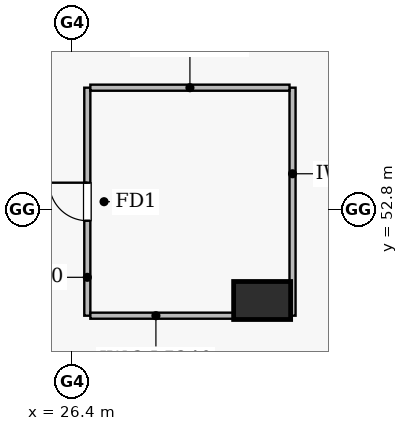
"""IFC4 building model, lengths in metres.
Left out: names, types, materials, properties, quantities, classifications, styles, units other than length and angle.
Written with IfcOpenShell. Run it as: python <this file> out.ifc"""

import sys

from ifc_helpers import new_model, si_unit, direction, frame, frame_2d, origin, origin_2d, place, context, subcontext, project, spatial, rectangle, extrude, element, fill, save


model = new_model("IFC4")
c1 = context("Model", 3, precision=1e-05, world=origin(), true_north=direction((0.0, 1.0)))
c2 = subcontext(c1, "Body", "Model", "MODEL_VIEW")
j1 = project(units=[si_unit("LENGTHUNIT", "METRE"), si_unit("PLANEANGLEUNIT", "RADIAN")], contexts=[c1])
p1 = place(None, origin())
s1 = spatial("IfcSite", under=j1, at=p1, CompositionType="ELEMENT")
p2 = place(p1, origin())
s2 = spatial("IfcBuilding", under=s1, at=p2, CompositionType="ELEMENT")
p3 = place(p2, frame((0.0, 0.0, -7.8)))
s3 = spatial("IfcBuildingStorey", under=s2, at=p3, CompositionType="ELEMENT", Elevation=-7.8)
p4 = place(p3, frame((31.4, 50.4, 0.0), z_axis=(0.0, 0.0, 1.0), x_axis=(1.0, 0.0, 0.0)))
e1 = element("IfcColumn", 1, at=p4, inside=s3, PredefinedType="COLUMN", context=c2, shape_type="SweptSolid", body=[
    extrude(rectangle(XDim=1.5, YDim=1.0, at=origin_2d()), origin(), (0.0, 0.0, 1.0), 3.9),
])
p5 = place(p3, frame((26.8, 50.0, 0.0), z_axis=(0.0, 0.0, 1.0), x_axis=(0.0, 1.0, 0.0)))
e2 = element("IfcWall", 2, at=p5, inside=s3, PredefinedType="SOLIDWALL", context=c2, shape_type="SweptSolid", body=[
    extrude(rectangle(XDim=6.0, YDim=0.16, at=frame_2d((3.0, 0.0))), origin(), (0.0, 0.0, 1.0), 2.768),
])
p6 = place(p5, frame((2.5, 0.0, 0.0)))
e3 = element("IfcOpeningElement", 3, at=p6, cuts=e2, PredefinedType="OPENING", context=c2, shape_type="SweptSolid", body=[
    extrude(rectangle(XDim=1.0, YDim=2.15, at=frame_2d((0.5, 1.075))), frame((0.0, 0.09, 0.0), z_axis=(0.0, -1.0, 0.0), x_axis=(1.0, 0.0, 0.0)), (0.0, 0.0, 1.0), 0.18),
])
p7 = place(p3, frame((32.2, 56.0, 0.0), z_axis=(0.0, 0.0, 1.0), x_axis=(0.0, -1.0, 0.0)))
e4 = element("IfcWall", 4, at=p7, inside=s3, PredefinedType="SOLIDWALL", context=c2, shape_type="SweptSolid", body=[
    extrude(rectangle(XDim=6.0, YDim=0.16, at=frame_2d((3.0, 0.0))), origin(), (0.0, 0.0, 1.0), 2.868),
])
p8 = place(p3, frame((26.88, 56.0, 0.0), z_axis=(0.0, 0.0, 1.0), x_axis=(1.0, 0.0, 0.0)))
e5 = element("IfcWall", 5, at=p8, inside=s3, PredefinedType="SOLIDWALL", context=c2, shape_type="SweptSolid", body=[
    extrude(rectangle(XDim=5.24, YDim=0.16, at=frame_2d((2.62, 0.0))), origin(), (0.0, 0.0, 1.0), 3.58),
])
p9 = place(p3, frame((32.12, 50.0, 0.0), z_axis=(0.0, 0.0, 1.0), x_axis=(-1.0, 0.0, 0.0)))
e6 = element("IfcWall", 6, at=p9, inside=s3, PredefinedType="SOLIDWALL", context=c2, shape_type="SweptSolid", body=[
    extrude(rectangle(XDim=5.24, YDim=0.16, at=frame_2d((2.62, 0.0))), origin(), (0.0, 0.0, 1.0), 2.818),
])
p10 = place(p6, origin())
e7 = element("IfcDoor", 7, at=p10, inside=s3, OperationType="SINGLE_SWING_RIGHT", PredefinedType="DOOR", context=c2, shape_type="SweptSolid", body=[
    extrude(rectangle(XDim=1.0, YDim=2.15, at=frame_2d((0.5, 1.075))), frame((0.0, 0.025, 0.0), z_axis=(0.0, -1.0, 0.0), x_axis=(1.0, 0.0, 0.0)), (0.0, 0.0, 1.0), 0.05),
])
fill(e3, e7)
save(model, sys.argv[1])
